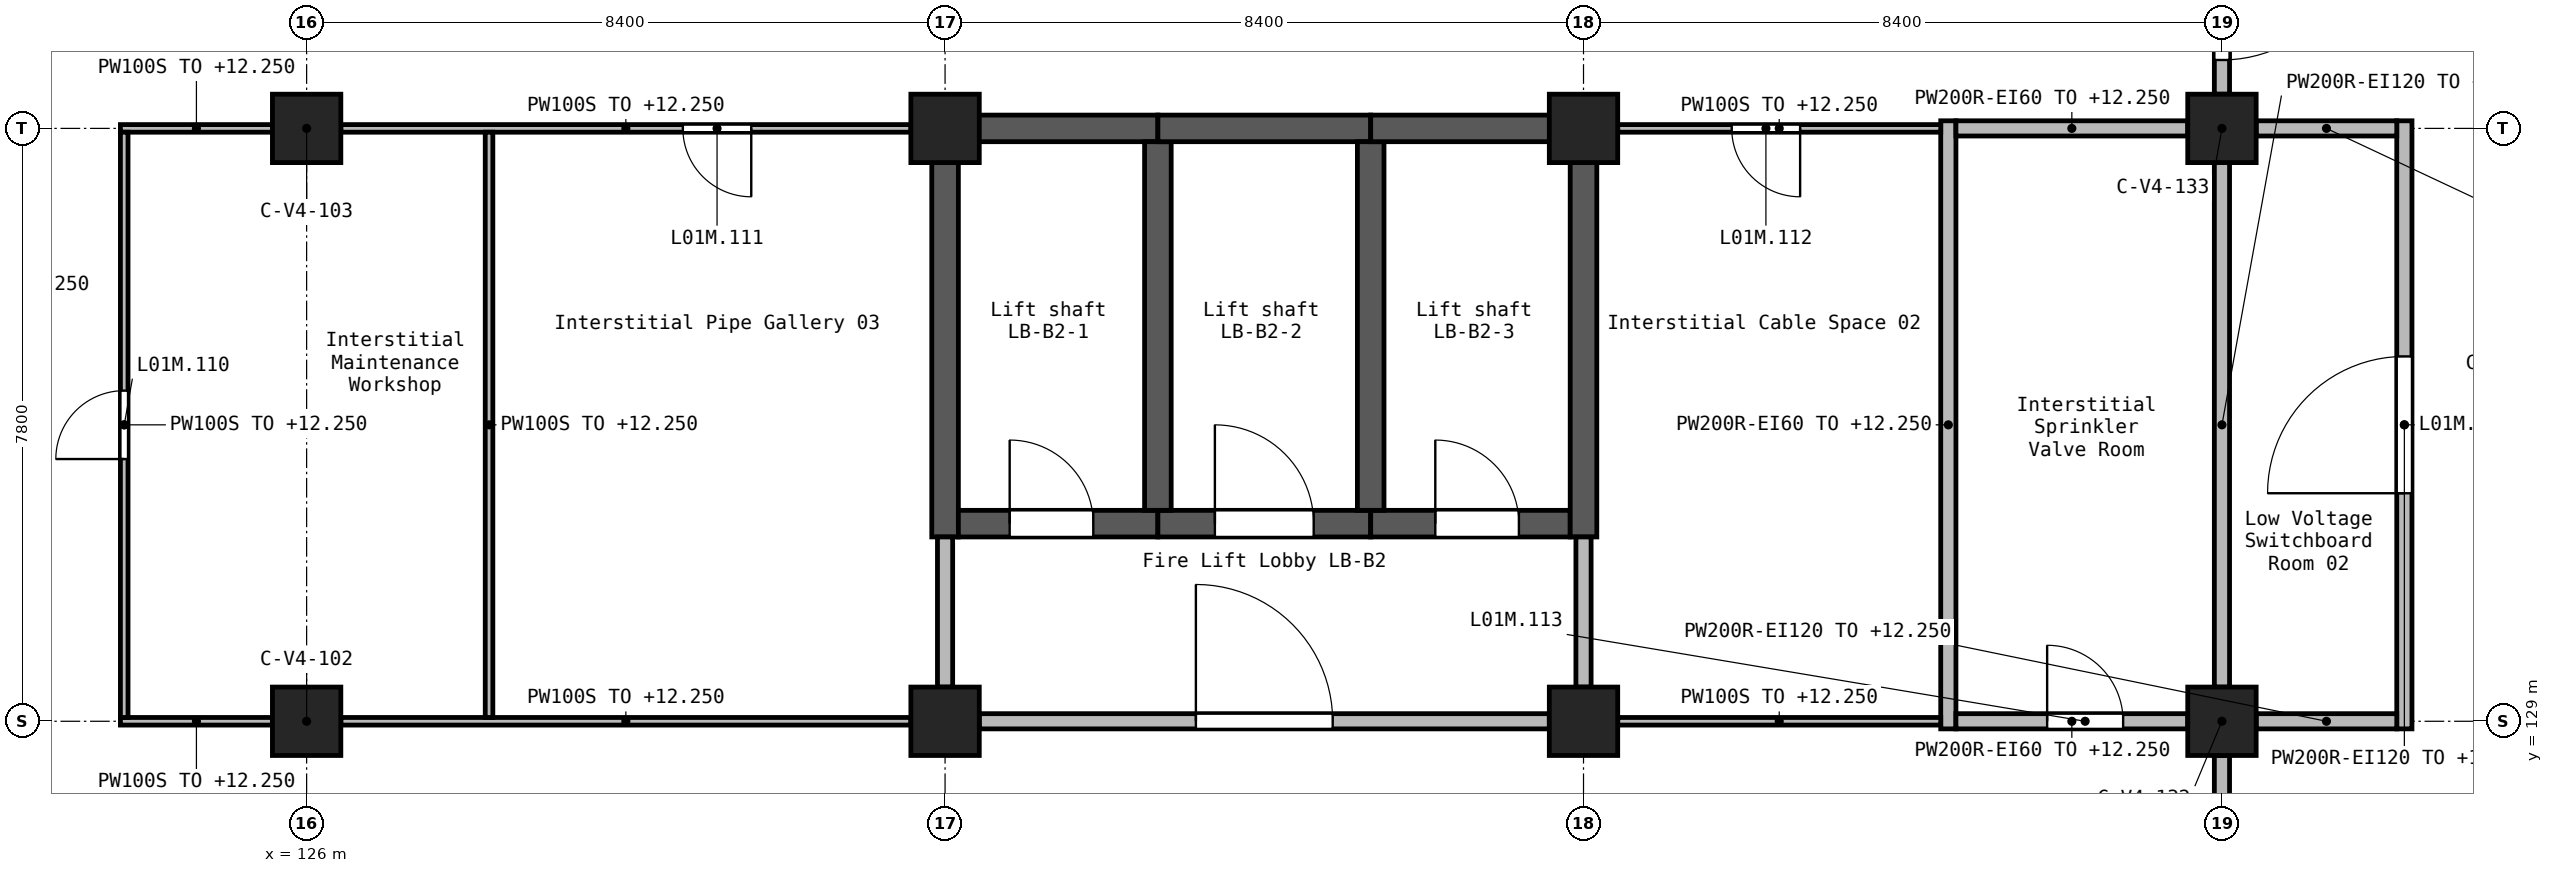
"""IFC4 building model, lengths in metres.
Left out: names, types, materials, properties, quantities, classifications, styles, units other than length and angle.
Written with IfcOpenShell. Run it as: python <this file> out.ifc"""

import sys

from ifc_helpers import new_model, si_unit, direction, frame, frame_2d, origin, origin_2d, place, context, subcontext, project, spatial, rectangle, extrude, element, fill, save


model = new_model("IFC4")
c1 = context("Model", 3, precision=1e-05, world=origin(), true_north=direction((0.0, 1.0)))
c2 = subcontext(c1, "Body", "Model", "MODEL_VIEW")
j1 = project(units=[si_unit("LENGTHUNIT", "METRE"), si_unit("PLANEANGLEUNIT", "RADIAN")], contexts=[c1])
p1 = place(None, origin())
s1 = spatial("IfcSite", under=j1, at=p1, CompositionType="ELEMENT")
p2 = place(p1, origin())
s2 = spatial("IfcBuilding", under=s1, at=p2, CompositionType="ELEMENT")
p3 = place(p2, frame((0.0, 0.0, 9.9)))
s3 = spatial("IfcBuildingStorey", under=s2, at=p3, CompositionType="ELEMENT", Elevation=9.9)
for number, where, z_axis, x_axis in (
    (1, (126.0, 129.0, 0.0), (0.0, 0.0, 1.0), (1.0, 0.0, 0.0)),
    (2, (126.0, 136.8, 0.0), (0.0, 0.0, 1.0), (1.0, 0.0, 0.0)),
    (3, (134.4, 129.0, 0.0), (0.0, 0.0, 1.0), (1.0, 0.0, 0.0)),
    (4, (134.4, 136.8, 0.0), (0.0, 0.0, 1.0), (1.0, 0.0, 0.0)),
    (5, (142.8, 129.0, 0.0), (0.0, 0.0, 1.0), (1.0, 0.0, 0.0)),
    (6, (142.8, 136.8, 0.0), (0.0, 0.0, 1.0), (1.0, 0.0, 0.0)),
    (7, (151.2, 129.0, 0.0), (0.0, 0.0, 1.0), (1.0, 0.0, 0.0)),
    (8, (151.2, 136.8, 0.0), (0.0, 0.0, 1.0), (1.0, 0.0, 0.0)),
):
    element("IfcColumn", number, at=place(p3, frame(where, z_axis=z_axis, x_axis=x_axis)), inside=s3, PredefinedType="COLUMN", context=c2, shape_type="SweptSolid", body=[
        extrude(rectangle(XDim=0.9, YDim=0.9, at=origin_2d()), origin(), (0.0, 0.0, 1.0), 2.7),
    ])
p4 = place(p3, frame((134.225, 136.8, 0.0), z_axis=(0.0, 0.0, 1.0), x_axis=(1.0, 0.0, 0.0)))
e9 = element("IfcWall", 9, at=p4, inside=s3, PredefinedType="SHEAR", context=c2, shape_type="SweptSolid", body=[
    extrude(rectangle(XDim=2.975, YDim=0.35, at=frame_2d((1.487, 0.0))), origin(), (0.0, 0.0, 1.0), 2.7),
])
p5 = place(p3, frame((134.4, 131.425, 0.0), z_axis=(0.0, 0.0, 1.0), x_axis=(0.0, 1.0, 0.0)))
e10 = element("IfcWall", 10, at=p5, inside=s3, PredefinedType="SHEAR", context=c2, shape_type="SweptSolid", body=[
    extrude(rectangle(XDim=5.2, YDim=0.35, at=frame_2d((2.6, 0.0))), origin(), (0.0, 0.0, 1.0), 2.7),
])
p6 = place(p3, frame((134.575, 131.6, 0.0), z_axis=(0.0, 0.0, 1.0), x_axis=(1.0, 0.0, 0.0)))
e11 = element("IfcWall", 11, at=p6, inside=s3, PredefinedType="SHEAR", context=c2, shape_type="SweptSolid", body=[
    extrude(rectangle(XDim=2.625, YDim=0.35, at=frame_2d((1.312, 0.0))), origin(), (0.0, 0.0, 1.0), 2.7),
])
p7 = place(p6, frame((0.675, 0.0, 0.0)))
e12 = element("IfcOpeningElement", 12, at=p7, cuts=e11, PredefinedType="OPENING", context=c2, shape_type="SweptSolid", body=[
    extrude(rectangle(XDim=1.1, YDim=2.1, at=frame_2d((0.55, 1.05))), frame((0.0, 0.185, 0.0), z_axis=(0.0, -1.0, 0.0), x_axis=(1.0, 0.0, 0.0)), (0.0, 0.0, 1.0), 0.37),
])
p8 = place(p3, frame((137.2, 131.6, 0.0), z_axis=(0.0, 0.0, 1.0), x_axis=(1.0, 0.0, 0.0)))
e13 = element("IfcWall", 13, at=p8, inside=s3, PredefinedType="SHEAR", context=c2, shape_type="SweptSolid", body=[
    extrude(rectangle(XDim=2.8, YDim=0.35, at=frame_2d((1.4, 0.0))), origin(), (0.0, 0.0, 1.0), 2.7),
])
p9 = place(p8, frame((0.75, 0.0, 0.0)))
e14 = element("IfcOpeningElement", 14, at=p9, cuts=e13, PredefinedType="OPENING", context=c2, shape_type="SweptSolid", body=[
    extrude(rectangle(XDim=1.3, YDim=2.1, at=frame_2d((0.65, 1.05))), frame((0.0, 0.185, 0.0), z_axis=(0.0, -1.0, 0.0), x_axis=(1.0, 0.0, 0.0)), (0.0, 0.0, 1.0), 0.37),
])
p10 = place(p3, frame((137.2, 131.775, 0.0), z_axis=(0.0, 0.0, 1.0), x_axis=(0.0, 1.0, 0.0)))
e15 = element("IfcWall", 15, at=p10, inside=s3, PredefinedType="SHEAR", context=c2, shape_type="SweptSolid", body=[
    extrude(rectangle(XDim=4.85, YDim=0.35, at=frame_2d((2.425, 0.0))), origin(), (0.0, 0.0, 1.0), 2.7),
])
p11 = place(p3, frame((137.2, 136.8, 0.0), z_axis=(0.0, 0.0, 1.0), x_axis=(1.0, 0.0, 0.0)))
e16 = element("IfcWall", 16, at=p11, inside=s3, PredefinedType="SHEAR", context=c2, shape_type="SweptSolid", body=[
    extrude(rectangle(XDim=2.8, YDim=0.35, at=frame_2d((1.4, 0.0))), origin(), (0.0, 0.0, 1.0), 2.7),
])
p12 = place(p3, frame((140.0, 131.6, 0.0), z_axis=(0.0, 0.0, 1.0), x_axis=(1.0, 0.0, 0.0)))
e17 = element("IfcWall", 17, at=p12, inside=s3, PredefinedType="SHEAR", context=c2, shape_type="SweptSolid", body=[
    extrude(rectangle(XDim=2.625, YDim=0.35, at=frame_2d((1.312, 0.0))), origin(), (0.0, 0.0, 1.0), 2.7),
])
p13 = place(p12, frame((0.85, 0.0, 0.0)))
e18 = element("IfcOpeningElement", 18, at=p13, cuts=e17, PredefinedType="OPENING", context=c2, shape_type="SweptSolid", body=[
    extrude(rectangle(XDim=1.1, YDim=2.1, at=frame_2d((0.55, 1.05))), frame((0.0, 0.185, 0.0), z_axis=(0.0, -1.0, 0.0), x_axis=(1.0, 0.0, 0.0)), (0.0, 0.0, 1.0), 0.37),
])
p14 = place(p3, frame((140.0, 131.775, 0.0), z_axis=(0.0, 0.0, 1.0), x_axis=(0.0, 1.0, 0.0)))
e19 = element("IfcWall", 19, at=p14, inside=s3, PredefinedType="SHEAR", context=c2, shape_type="SweptSolid", body=[
    extrude(rectangle(XDim=4.85, YDim=0.35, at=frame_2d((2.425, 0.0))), origin(), (0.0, 0.0, 1.0), 2.7),
])
p15 = place(p3, frame((140.0, 136.8, 0.0), z_axis=(0.0, 0.0, 1.0), x_axis=(1.0, 0.0, 0.0)))
e20 = element("IfcWall", 20, at=p15, inside=s3, PredefinedType="SHEAR", context=c2, shape_type="SweptSolid", body=[
    extrude(rectangle(XDim=2.625, YDim=0.35, at=frame_2d((1.312, 0.0))), origin(), (0.0, 0.0, 1.0), 2.7),
])
p16 = place(p3, frame((142.8, 131.425, 0.0), z_axis=(0.0, 0.0, 1.0), x_axis=(0.0, 1.0, 0.0)))
e21 = element("IfcWall", 21, at=p16, inside=s3, PredefinedType="SHEAR", context=c2, shape_type="SweptSolid", body=[
    extrude(rectangle(XDim=5.55, YDim=0.35, at=frame_2d((2.775, 0.0))), origin(), (0.0, 0.0, 1.0), 2.7),
])
p17 = place(p3, frame((151.2, 139.95, 0.0), z_axis=(0.0, 0.0, 1.0), x_axis=(0.0, -1.0, 0.0)))
e22 = element("IfcWall", 22, at=p17, inside=s3, PredefinedType="SOLIDWALL", context=c2, shape_type="SweptSolid", body=[
    extrude(rectangle(XDim=2.7, YDim=0.2, at=frame_2d((1.35, 0.0))), origin(), (0.0, 0.0, 1.0), 2.35),
])
p18 = place(p17, frame((0.45, 0.0, 0.0)))
e23 = element("IfcOpeningElement", 23, at=p18, cuts=e22, PredefinedType="OPENING", context=c2, shape_type="SweptSolid", body=[
    extrude(rectangle(XDim=1.8, YDim=2.1, at=frame_2d((0.9, 1.05))), frame((0.0, 0.11, 0.0), z_axis=(0.0, -1.0, 0.0), x_axis=(1.0, 0.0, 0.0)), (0.0, 0.0, 1.0), 0.22),
])
p19 = place(p3, frame((151.2, 136.35, 0.0), z_axis=(0.0, 0.0, 1.0), x_axis=(0.0, -1.0, 0.0)))
e24 = element("IfcWall", 24, at=p19, inside=s3, PredefinedType="SOLIDWALL", context=c2, shape_type="SweptSolid", body=[
    extrude(rectangle(XDim=6.9, YDim=0.2, at=frame_2d((3.45, 0.0))), origin(), (0.0, 0.0, 1.0), 2.35),
])
p20 = place(p3, frame((151.2, 128.55, 0.0), z_axis=(0.0, 0.0, 1.0), x_axis=(0.0, -1.0, 0.0)))
e25 = element("IfcWall", 25, at=p20, inside=s3, PredefinedType="SOLIDWALL", context=c2, shape_type="SweptSolid", body=[
    extrude(rectangle(XDim=2.7, YDim=0.2, at=frame_2d((1.35, 0.0))), origin(), (0.0, 0.0, 1.0), 2.35),
])
p21 = place(p3, frame((134.85, 129.0, 0.0), z_axis=(0.0, 0.0, 1.0), x_axis=(1.0, 0.0, 0.0)))
e26 = element("IfcWall", 26, at=p21, inside=s3, PredefinedType="SOLIDWALL", context=c2, shape_type="SweptSolid", body=[
    extrude(rectangle(XDim=7.5, YDim=0.2, at=frame_2d((3.75, 0.0))), origin(), (0.0, 0.0, 1.0), 2.35),
])
p22 = place(p21, frame((2.85, 0.0, 0.0)))
e27 = element("IfcOpeningElement", 27, at=p22, cuts=e26, PredefinedType="OPENING", context=c2, shape_type="SweptSolid", body=[
    extrude(rectangle(XDim=1.8, YDim=2.1, at=frame_2d((0.9, 1.05))), frame((0.0, 0.11, 0.0), z_axis=(0.0, -1.0, 0.0), x_axis=(1.0, 0.0, 0.0)), (0.0, 0.0, 1.0), 0.22),
])
p23 = place(p3, frame((147.6, 128.9, 0.0), z_axis=(0.0, 0.0, 1.0), x_axis=(0.0, 1.0, 0.0)))
e28 = element("IfcWall", 28, at=p23, inside=s3, PredefinedType="SOLIDWALL", context=c2, shape_type="SweptSolid", body=[
    extrude(rectangle(XDim=8.0, YDim=0.2, at=frame_2d((4.0, 0.0))), origin(), (0.0, 0.0, 1.0), 2.35),
])
p24 = place(p3, frame((153.6, 128.9, 0.0), z_axis=(0.0, 0.0, 1.0), x_axis=(0.0, 1.0, 0.0)))
e29 = element("IfcWall", 29, at=p24, inside=s3, PredefinedType="SOLIDWALL", context=c2, shape_type="SweptSolid", body=[
    extrude(rectangle(XDim=8.0, YDim=0.2, at=frame_2d((4.0, 0.0))), origin(), (0.0, 0.0, 1.0), 2.35),
])
p25 = place(p24, frame((3.1, 0.0, 0.0)))
e30 = element("IfcOpeningElement", 30, at=p25, cuts=e29, PredefinedType="OPENING", context=c2, shape_type="SweptSolid", body=[
    extrude(rectangle(XDim=1.8, YDim=2.1, at=frame_2d((0.9, 1.05))), frame((0.0, 0.11, 0.0), z_axis=(0.0, -1.0, 0.0), x_axis=(1.0, 0.0, 0.0)), (0.0, 0.0, 1.0), 0.22),
])
p26 = place(p3, frame((147.7, 129.0, 0.0), z_axis=(0.0, 0.0, 1.0), x_axis=(1.0, 0.0, 0.0)))
e31 = element("IfcWall", 31, at=p26, inside=s3, PredefinedType="SOLIDWALL", context=c2, shape_type="SweptSolid", body=[
    extrude(rectangle(XDim=3.05, YDim=0.2, at=frame_2d((1.525, 0.0))), origin(), (0.0, 0.0, 1.0), 2.35),
])
p27 = place(p26, frame((1.2, 0.0, 0.0)))
e32 = element("IfcOpeningElement", 32, at=p27, cuts=e31, PredefinedType="OPENING", context=c2, shape_type="SweptSolid", body=[
    extrude(rectangle(XDim=1.0, YDim=2.1, at=frame_2d((0.5, 1.05))), frame((0.0, 0.11, 0.0), z_axis=(0.0, -1.0, 0.0), x_axis=(1.0, 0.0, 0.0)), (0.0, 0.0, 1.0), 0.22),
])
p28 = place(p3, frame((147.7, 136.8, 0.0), z_axis=(0.0, 0.0, 1.0), x_axis=(1.0, 0.0, 0.0)))
e33 = element("IfcWall", 33, at=p28, inside=s3, PredefinedType="SOLIDWALL", context=c2, shape_type="SweptSolid", body=[
    extrude(rectangle(XDim=3.05, YDim=0.2, at=frame_2d((1.525, 0.0))), origin(), (0.0, 0.0, 1.0), 2.35),
])
for number, where, z_axis, x_axis in (
    (34, (134.4, 129.45, 0.0), (0.0, 0.0, 1.0), (0.0, 1.0, 0.0)),
    (35, (142.8, 129.45, 0.0), (0.0, 0.0, 1.0), (0.0, 1.0, 0.0)),
):
    element("IfcWall", number, at=place(p3, frame(where, z_axis=z_axis, x_axis=x_axis)), inside=s3, PredefinedType="SOLIDWALL", context=c2, shape_type="SweptSolid", body=[
        extrude(rectangle(XDim=1.975, YDim=0.2, at=frame_2d((0.988, 0.0))), origin(), (0.0, 0.0, 1.0), 2.35),
    ])
for number, where, z_axis, x_axis in (
    (36, (151.65, 129.0, 0.0), (0.0, 0.0, 1.0), (1.0, 0.0, 0.0)),
    (37, (151.65, 136.8, 0.0), (0.0, 0.0, 1.0), (1.0, 0.0, 0.0)),
):
    element("IfcWall", number, at=place(p3, frame(where, z_axis=z_axis, x_axis=x_axis)), inside=s3, PredefinedType="SOLIDWALL", context=c2, shape_type="SweptSolid", body=[
        extrude(rectangle(XDim=1.85, YDim=0.2, at=frame_2d((0.925, 0.0))), origin(), (0.0, 0.0, 1.0), 2.35),
    ])
p29 = place(p3, frame((147.5, 136.8, 0.0), z_axis=(0.0, 0.0, 1.0), x_axis=(-1.0, 0.0, 0.0)))
e38 = element("IfcWall", 38, at=p29, inside=s3, PredefinedType="PARTITIONING", context=c2, shape_type="SweptSolid", body=[
    extrude(rectangle(XDim=4.25, YDim=0.1, at=frame_2d((2.125, 0.0))), origin(), (0.0, 0.0, 1.0), 2.35),
])
p30 = place(p29, frame((1.85, 0.0, 0.0)))
e39 = element("IfcOpeningElement", 39, at=p30, cuts=e38, PredefinedType="OPENING", context=c2, shape_type="SweptSolid", body=[
    extrude(rectangle(XDim=0.9, YDim=2.1, at=frame_2d((0.45, 1.05))), frame((0.0, 0.06, 0.0), z_axis=(0.0, -1.0, 0.0), x_axis=(1.0, 0.0, 0.0)), (0.0, 0.0, 1.0), 0.12),
])
p31 = place(p3, frame((133.95, 136.8, 0.0), z_axis=(0.0, 0.0, 1.0), x_axis=(-1.0, 0.0, 0.0)))
e40 = element("IfcWall", 40, at=p31, inside=s3, PredefinedType="PARTITIONING", context=c2, shape_type="SweptSolid", body=[
    extrude(rectangle(XDim=7.5, YDim=0.1, at=frame_2d((3.75, 0.0))), origin(), (0.0, 0.0, 1.0), 2.35),
])
p32 = place(p31, frame((2.1, 0.0, 0.0)))
e41 = element("IfcOpeningElement", 41, at=p32, cuts=e40, PredefinedType="OPENING", context=c2, shape_type="SweptSolid", body=[
    extrude(rectangle(XDim=0.9, YDim=2.1, at=frame_2d((0.45, 1.05))), frame((0.0, 0.06, 0.0), z_axis=(0.0, -1.0, 0.0), x_axis=(1.0, 0.0, 0.0)), (0.0, 0.0, 1.0), 0.12),
])
for number, where, z_axis, x_axis in (
    (42, (125.55, 136.8, 0.0), (0.0, 0.0, 1.0), (-1.0, 0.0, 0.0)),
    (43, (123.55, 129.0, 0.0), (0.0, 0.0, 1.0), (1.0, 0.0, 0.0)),
):
    element("IfcWall", number, at=place(p3, frame(where, z_axis=z_axis, x_axis=x_axis)), inside=s3, PredefinedType="PARTITIONING", context=c2, shape_type="SweptSolid", body=[
        extrude(rectangle(XDim=2.0, YDim=0.1, at=frame_2d((1.0, 0.0))), origin(), (0.0, 0.0, 1.0), 2.35),
    ])
p33 = place(p3, frame((126.45, 129.0, 0.0), z_axis=(0.0, 0.0, 1.0), x_axis=(1.0, 0.0, 0.0)))
e44 = element("IfcWall", 44, at=p33, inside=s3, PredefinedType="PARTITIONING", context=c2, shape_type="SweptSolid", body=[
    extrude(rectangle(XDim=7.5, YDim=0.1, at=frame_2d((3.75, 0.0))), origin(), (0.0, 0.0, 1.0), 2.35),
])
p34 = place(p3, frame((123.6, 129.05, 0.0), z_axis=(0.0, 0.0, 1.0), x_axis=(0.0, 1.0, 0.0)))
e45 = element("IfcWall", 45, at=p34, inside=s3, PredefinedType="PARTITIONING", context=c2, shape_type="SweptSolid", body=[
    extrude(rectangle(XDim=7.7, YDim=0.1, at=frame_2d((3.85, 0.0))), origin(), (0.0, 0.0, 1.0), 2.35),
])
p35 = place(p34, frame((3.4, 0.0, 0.0)))
e46 = element("IfcOpeningElement", 46, at=p35, cuts=e45, PredefinedType="OPENING", context=c2, shape_type="SweptSolid", body=[
    extrude(rectangle(XDim=0.9, YDim=2.1, at=frame_2d((0.45, 1.05))), frame((0.0, 0.06, 0.0), z_axis=(0.0, -1.0, 0.0), x_axis=(1.0, 0.0, 0.0)), (0.0, 0.0, 1.0), 0.12),
])
p36 = place(p3, frame((128.4, 129.05, 0.0), z_axis=(0.0, 0.0, 1.0), x_axis=(0.0, 1.0, 0.0)))
e47 = element("IfcWall", 47, at=p36, inside=s3, PredefinedType="PARTITIONING", context=c2, shape_type="SweptSolid", body=[
    extrude(rectangle(XDim=7.7, YDim=0.1, at=frame_2d((3.85, 0.0))), origin(), (0.0, 0.0, 1.0), 2.35),
])
p37 = place(p3, frame((143.25, 129.0, 0.0), z_axis=(0.0, 0.0, 1.0), x_axis=(1.0, 0.0, 0.0)))
e48 = element("IfcWall", 48, at=p37, inside=s3, PredefinedType="PARTITIONING", context=c2, shape_type="SweptSolid", body=[
    extrude(rectangle(XDim=4.25, YDim=0.1, at=frame_2d((2.125, 0.0))), origin(), (0.0, 0.0, 1.0), 2.35),
])
p38 = place(p18, frame((1.8, 0.0, 0.0), z_axis=(0.0, 0.0, 1.0), x_axis=(-1.0, 0.0, 0.0)))
e49 = element("IfcDoor", 49, at=p38, inside=s3, OperationType="DOUBLE_DOOR_SINGLE_SWING", PredefinedType="DOOR", context=c2, shape_type="SweptSolid", body=[
    extrude(rectangle(XDim=1.8, YDim=2.1, at=frame_2d((0.9, 1.05))), frame((0.0, 0.025, 0.0), z_axis=(0.0, -1.0, 0.0), x_axis=(1.0, 0.0, 0.0)), (0.0, 0.0, 1.0), 0.05),
])
fill(e23, e49)
p39 = place(p22, origin())
e50 = element("IfcDoor", 50, at=p39, inside=s3, OperationType="DOUBLE_DOOR_SINGLE_SWING", PredefinedType="DOOR", context=c2, shape_type="SweptSolid", body=[
    extrude(rectangle(XDim=1.8, YDim=2.1, at=frame_2d((0.9, 1.05))), frame((0.0, 0.025, 0.0), z_axis=(0.0, -1.0, 0.0), x_axis=(1.0, 0.0, 0.0)), (0.0, 0.0, 1.0), 0.05),
])
fill(e27, e50)
p40 = place(p35, frame((0.9, 0.0, 0.0), z_axis=(0.0, 0.0, 1.0), x_axis=(-1.0, 0.0, 0.0)))
e51 = element("IfcDoor", 51, at=p40, inside=s3, OperationType="SINGLE_SWING_RIGHT", PredefinedType="DOOR", context=c2, shape_type="SweptSolid", body=[
    extrude(rectangle(XDim=0.9, YDim=2.1, at=frame_2d((0.45, 1.05))), frame((0.0, 0.025, 0.0), z_axis=(0.0, -1.0, 0.0), x_axis=(1.0, 0.0, 0.0)), (0.0, 0.0, 1.0), 0.05),
])
fill(e46, e51)
p41 = place(p32, origin())
e52 = element("IfcDoor", 52, at=p41, inside=s3, OperationType="SINGLE_SWING_LEFT", PredefinedType="DOOR", context=c2, shape_type="SweptSolid", body=[
    extrude(rectangle(XDim=0.9, YDim=2.1, at=frame_2d((0.45, 1.05))), frame((0.0, 0.025, 0.0), z_axis=(0.0, -1.0, 0.0), x_axis=(1.0, 0.0, 0.0)), (0.0, 0.0, 1.0), 0.05),
])
fill(e41, e52)
p42 = place(p30, origin())
e53 = element("IfcDoor", 53, at=p42, inside=s3, OperationType="SINGLE_SWING_RIGHT", PredefinedType="DOOR", context=c2, shape_type="SweptSolid", body=[
    extrude(rectangle(XDim=0.9, YDim=2.1, at=frame_2d((0.45, 1.05))), frame((0.0, 0.025, 0.0), z_axis=(0.0, -1.0, 0.0), x_axis=(1.0, 0.0, 0.0)), (0.0, 0.0, 1.0), 0.05),
])
fill(e39, e53)
p43 = place(p27, origin())
e54 = element("IfcDoor", 54, at=p43, inside=s3, OperationType="SINGLE_SWING_RIGHT", PredefinedType="DOOR", context=c2, shape_type="SweptSolid", body=[
    extrude(rectangle(XDim=1.0, YDim=2.1, at=frame_2d((0.5, 1.05))), frame((0.0, 0.025, 0.0), z_axis=(0.0, -1.0, 0.0), x_axis=(1.0, 0.0, 0.0)), (0.0, 0.0, 1.0), 0.05),
])
fill(e32, e54)
p44 = place(p25, origin())
e55 = element("IfcDoor", 55, at=p44, inside=s3, OperationType="DOUBLE_DOOR_SINGLE_SWING", PredefinedType="DOOR", context=c2, shape_type="SweptSolid", body=[
    extrude(rectangle(XDim=1.8, YDim=2.1, at=frame_2d((0.9, 1.05))), frame((0.0, 0.025, 0.0), z_axis=(0.0, -1.0, 0.0), x_axis=(1.0, 0.0, 0.0)), (0.0, 0.0, 1.0), 0.05),
])
fill(e30, e55)
p45 = place(p7, origin())
e56 = element("IfcDoor", 56, at=p45, inside=s3, OperationType="DOUBLE_DOOR_SLIDING", PredefinedType="DOOR", context=c2, shape_type="SweptSolid", body=[
    extrude(rectangle(XDim=1.1, YDim=2.1, at=frame_2d((0.55, 1.05))), frame((0.0, 0.025, 0.0), z_axis=(0.0, -1.0, 0.0), x_axis=(1.0, 0.0, 0.0)), (0.0, 0.0, 1.0), 0.05),
])
fill(e12, e56)
p46 = place(p9, origin())
e57 = element("IfcDoor", 57, at=p46, inside=s3, OperationType="DOUBLE_DOOR_SLIDING", PredefinedType="DOOR", context=c2, shape_type="SweptSolid", body=[
    extrude(rectangle(XDim=1.3, YDim=2.1, at=frame_2d((0.65, 1.05))), frame((0.0, 0.025, 0.0), z_axis=(0.0, -1.0, 0.0), x_axis=(1.0, 0.0, 0.0)), (0.0, 0.0, 1.0), 0.05),
])
fill(e14, e57)
p47 = place(p13, origin())
e58 = element("IfcDoor", 58, at=p47, inside=s3, OperationType="DOUBLE_DOOR_SLIDING", PredefinedType="DOOR", context=c2, shape_type="SweptSolid", body=[
    extrude(rectangle(XDim=1.1, YDim=2.1, at=frame_2d((0.55, 1.05))), frame((0.0, 0.025, 0.0), z_axis=(0.0, -1.0, 0.0), x_axis=(1.0, 0.0, 0.0)), (0.0, 0.0, 1.0), 0.05),
])
fill(e18, e58)
save(model, sys.argv[1])
